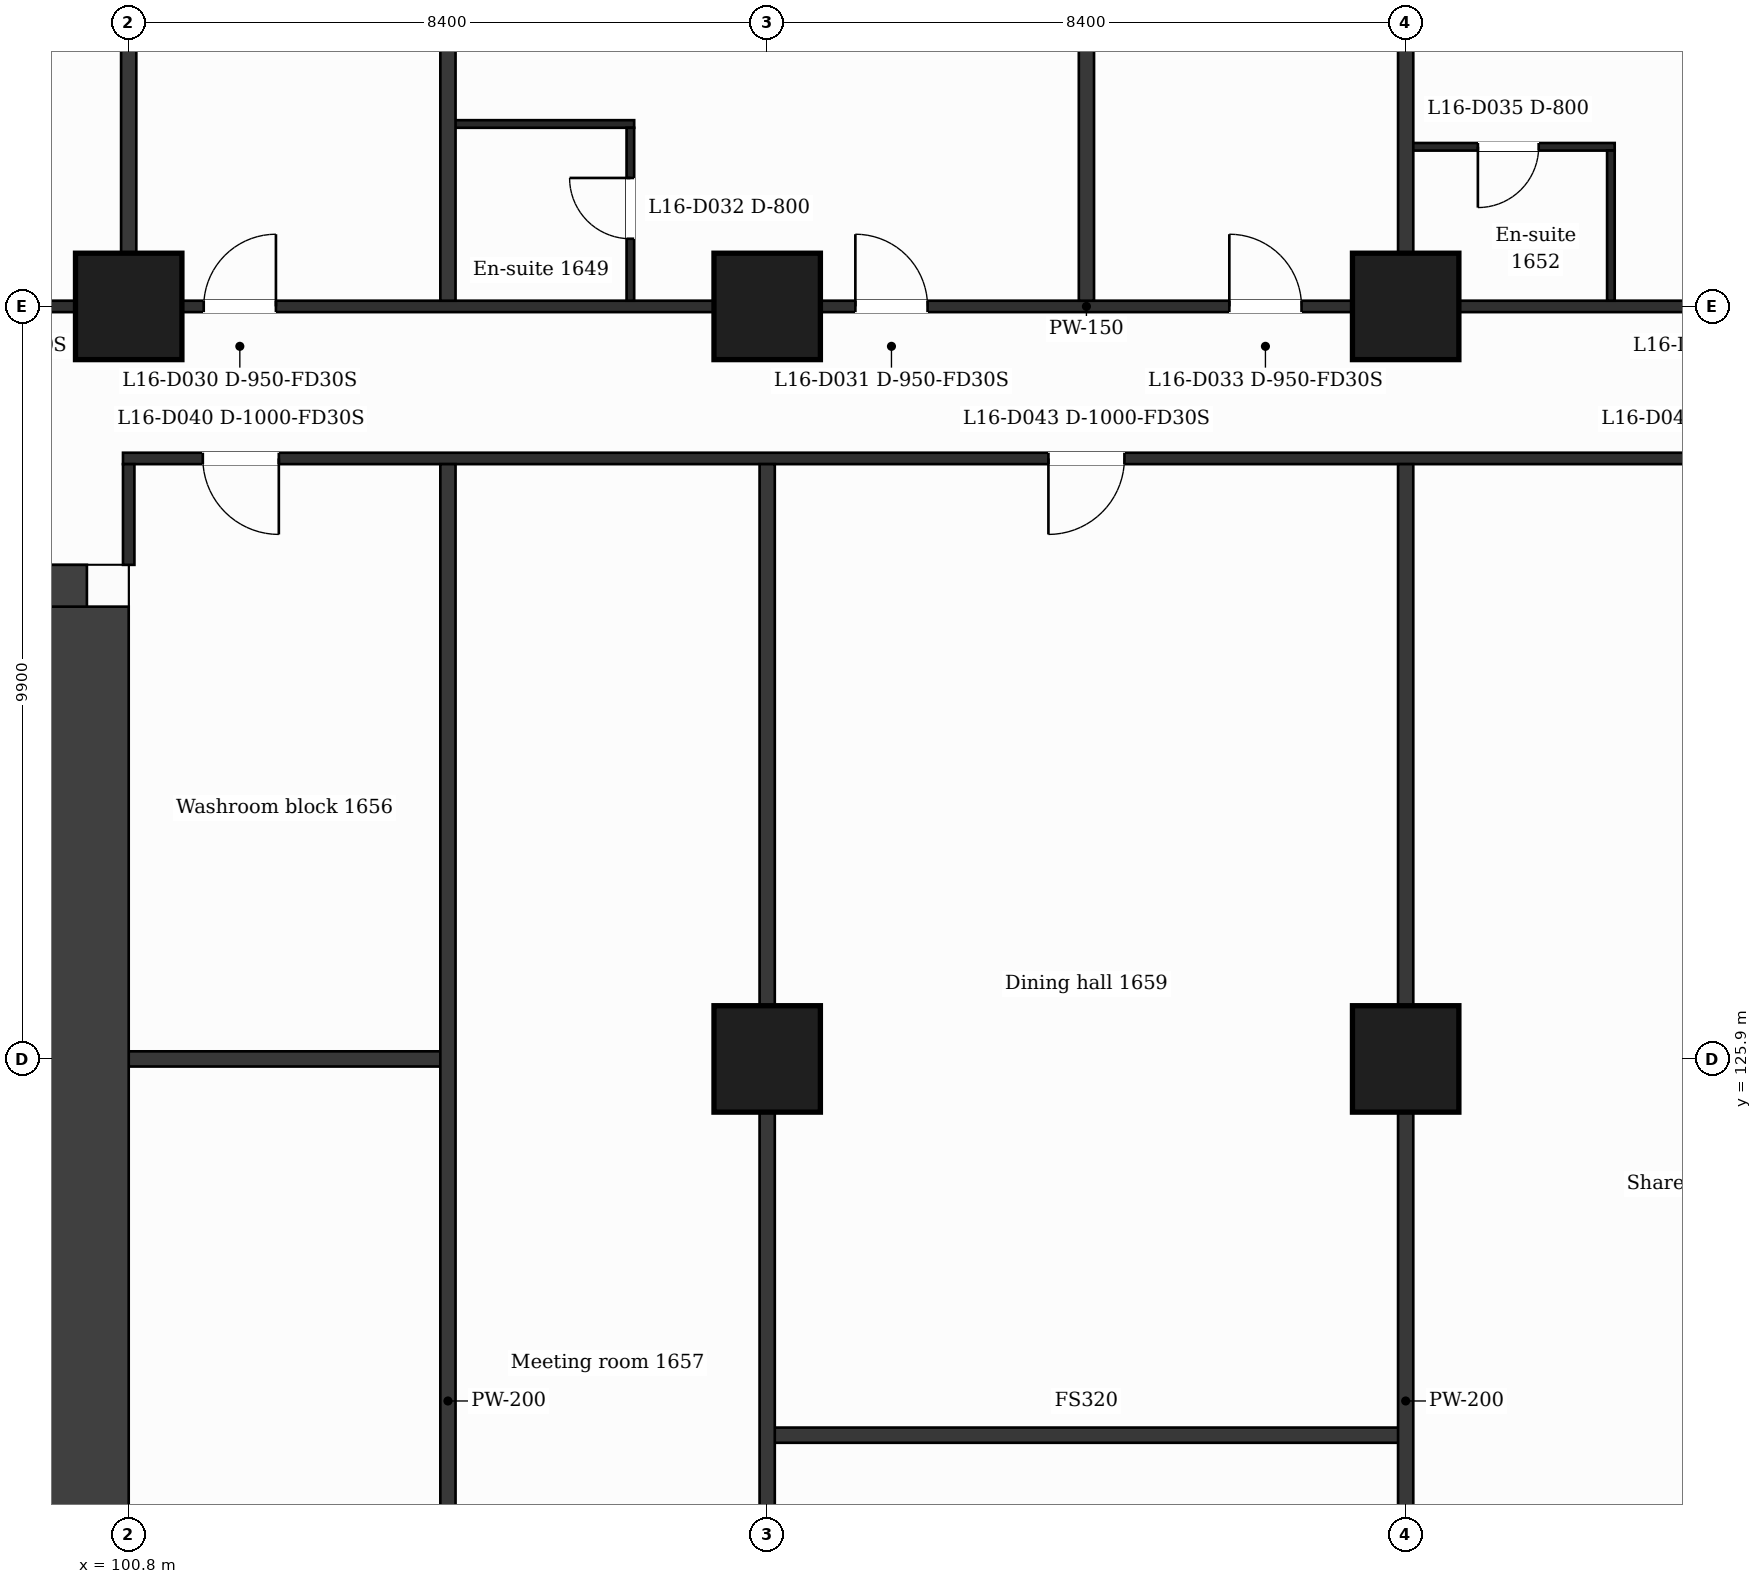
"""IFC4 building model, lengths in metres.
Left out: names, types, materials, properties, quantities, classifications, styles, units other than length and angle.
Written with IfcOpenShell. Run it as: python <this file> out.ifc"""

import sys

from ifc_helpers import new_model, si_unit, direction, frame, frame_2d, origin, origin_2d, place, context, subcontext, project, spatial, rectangle, extrude, element, fill, save


model = new_model("IFC4")
c1 = context("Model", 3, precision=1e-05, world=origin(), true_north=direction((0.0, 1.0)))
c2 = subcontext(c1, "Body", "Model", "MODEL_VIEW")
j1 = project(units=[si_unit("LENGTHUNIT", "METRE"), si_unit("PLANEANGLEUNIT", "RADIAN")], contexts=[c1])
p1 = place(None, origin())
s1 = spatial("IfcSite", under=j1, at=p1, CompositionType="ELEMENT")
p2 = place(p1, origin())
s2 = spatial("IfcBuilding", under=s1, at=p2, CompositionType="ELEMENT")
p3 = place(p2, frame((0.0, 0.0, 74.0)))
s3 = spatial("IfcBuildingStorey", under=s2, at=p3, CompositionType="ELEMENT", Elevation=74.0)
p4 = place(p3, frame((89.112, 131.85, 0.0), z_axis=(0.0, 0.0, 1.0), x_axis=(1.0, 0.0, 0.0)))
e1 = element("IfcWall", 1, at=p4, inside=s3, PredefinedType="SHEAR", context=c2, shape_type="SweptSolid", body=[
    extrude(rectangle(XDim=11.138, YDim=1.1, at=frame_2d((5.569, 0.0))), origin(), (0.0, 0.0, 1.0), 3.5),
])
p5 = place(p4, frame((6.552, 0.0, 0.0)))
e2 = element("IfcOpeningElement", 2, at=p5, cuts=e1, PredefinedType="OPENING", context=c2, shape_type="SweptSolid", body=[
    extrude(rectangle(XDim=1.2, YDim=2.1, at=frame_2d((0.6, 1.05))), frame((0.0, 0.56, 0.0), z_axis=(0.0, -1.0, 0.0), x_axis=(1.0, 0.0, 0.0)), (0.0, 0.0, 1.0), 1.12),
])
p6 = place(p3, frame((100.25, 131.85, 0.0), z_axis=(0.0, 0.0, 1.0), x_axis=(0.0, -1.0, 0.0)))
e3 = element("IfcWall", 3, at=p6, inside=s3, PredefinedType="SHEAR", context=c2, shape_type="SweptSolid", body=[
    extrude(rectangle(XDim=20.9, YDim=1.1, at=frame_2d((10.45, 0.0))), origin(), (0.0, 0.0, 1.0), 3.5),
])
for number, where, z_axis, x_axis in (
    (4, (109.2, 125.9, 0.0), (0.0, 0.0, 1.0), (1.0, 0.0, 0.0)),
    (5, (117.6, 125.9, 0.0), (0.0, 0.0, 1.0), (1.0, 0.0, 0.0)),
    (6, (100.8, 135.8, 0.0), (0.0, 0.0, 1.0), (1.0, 0.0, 0.0)),
    (7, (109.2, 135.8, 0.0), (0.0, 0.0, 1.0), (1.0, 0.0, 0.0)),
    (8, (117.6, 135.8, 0.0), (0.0, 0.0, 1.0), (1.0, 0.0, 0.0)),
):
    element("IfcColumn", number, at=place(p3, frame(where, z_axis=z_axis, x_axis=x_axis)), inside=s3, PredefinedType="COLUMN", context=c2, shape_type="SweptSolid", body=[
        extrude(rectangle(XDim=1.4, YDim=1.4, at=origin_2d()), origin(), (0.0, 0.0, 1.0), 3.5),
    ])
p7 = place(p3, frame((109.2, 120.95, 0.0), z_axis=(0.0, 0.0, 1.0), x_axis=(1.0, 0.0, 0.0)))
e9 = element("IfcWall", 9, at=p7, inside=s3, PredefinedType="PARTITIONING", context=c2, shape_type="SweptSolid", body=[
    extrude(rectangle(XDim=8.4, YDim=0.2, at=frame_2d((4.2, 0.0))), origin(), (0.0, 0.0, 1.0), 3.18),
])
p8 = place(p3, frame((100.8, 125.9, 0.0), z_axis=(0.0, 0.0, 1.0), x_axis=(1.0, 0.0, 0.0)))
e10 = element("IfcWall", 10, at=p8, inside=s3, PredefinedType="PARTITIONING", context=c2, shape_type="SweptSolid", body=[
    extrude(rectangle(XDim=4.2, YDim=0.2, at=frame_2d((2.1, 0.0))), origin(), (0.0, 0.0, 1.0), 3.18),
])
p9 = place(p3, frame((100.725, 133.8, 0.0), z_axis=(0.0, 0.0, 1.0), x_axis=(1.0, 0.0, 0.0)))
e11 = element("IfcWall", 11, at=p9, inside=s3, PredefinedType="PARTITIONING", context=c2, shape_type="SweptSolid", body=[
    extrude(rectangle(XDim=25.35, YDim=0.15, at=frame_2d((12.675, 0.0))), origin(), (0.0, 0.0, 1.0), 3.18),
])
p10 = place(p9, frame((1.05, 0.0, 0.0)))
e12 = element("IfcOpeningElement", 12, at=p10, cuts=e11, PredefinedType="OPENING", context=c2, shape_type="SweptSolid", body=[
    extrude(rectangle(XDim=1.0, YDim=2.1, at=frame_2d((0.5, 1.05))), frame((0.0, 0.085, 0.0), z_axis=(0.0, -1.0, 0.0), x_axis=(1.0, 0.0, 0.0)), (0.0, 0.0, 1.0), 0.17),
])
p11 = place(p9, frame((12.175, 0.0, 0.0)))
e13 = element("IfcOpeningElement", 13, at=p11, cuts=e11, PredefinedType="OPENING", context=c2, shape_type="SweptSolid", body=[
    extrude(rectangle(XDim=1.0, YDim=2.1, at=frame_2d((0.5, 1.05))), frame((0.0, 0.085, 0.0), z_axis=(0.0, -1.0, 0.0), x_axis=(1.0, 0.0, 0.0)), (0.0, 0.0, 1.0), 0.17),
])
p12 = place(p9, frame((20.575, 0.0, 0.0)))
e14 = element("IfcOpeningElement", 14, at=p12, cuts=e11, PredefinedType="OPENING", context=c2, shape_type="SweptSolid", body=[
    extrude(rectangle(XDim=1.0, YDim=2.1, at=frame_2d((0.5, 1.05))), frame((0.0, 0.085, 0.0), z_axis=(0.0, -1.0, 0.0), x_axis=(1.0, 0.0, 0.0)), (0.0, 0.0, 1.0), 0.17),
])
p13 = place(p3, frame((90.895, 135.8, 0.0), z_axis=(0.0, 0.0, 1.0), x_axis=(1.0, 0.0, 0.0)))
e15 = element("IfcWall", 15, at=p13, inside=s3, PredefinedType="PARTITIONING", context=c2, shape_type="SweptSolid", body=[
    extrude(rectangle(XDim=45.011, YDim=0.15, at=frame_2d((22.505, 0.0))), origin(), (0.0, 0.0, 1.0), 3.18),
])
p14 = place(p13, frame((7.068, 0.0, 0.0)))
e16 = element("IfcOpeningElement", 16, at=p14, cuts=e15, PredefinedType="OPENING", context=c2, shape_type="SweptSolid", body=[
    extrude(rectangle(XDim=0.95, YDim=2.1, at=frame_2d((0.475, 1.05))), frame((0.0, 0.085, 0.0), z_axis=(0.0, -1.0, 0.0), x_axis=(1.0, 0.0, 0.0)), (0.0, 0.0, 1.0), 0.17),
])
p15 = place(p13, frame((10.892, 0.0, 0.0)))
e17 = element("IfcOpeningElement", 17, at=p15, cuts=e15, PredefinedType="OPENING", context=c2, shape_type="SweptSolid", body=[
    extrude(rectangle(XDim=0.95, YDim=2.1, at=frame_2d((0.475, 1.05))), frame((0.0, 0.085, 0.0), z_axis=(0.0, -1.0, 0.0), x_axis=(1.0, 0.0, 0.0)), (0.0, 0.0, 1.0), 0.17),
])
p16 = place(p13, frame((19.465, 0.0, 0.0)))
e18 = element("IfcOpeningElement", 18, at=p16, cuts=e15, PredefinedType="OPENING", context=c2, shape_type="SweptSolid", body=[
    extrude(rectangle(XDim=0.95, YDim=2.1, at=frame_2d((0.475, 1.05))), frame((0.0, 0.085, 0.0), z_axis=(0.0, -1.0, 0.0), x_axis=(1.0, 0.0, 0.0)), (0.0, 0.0, 1.0), 0.17),
])
p17 = place(p13, frame((24.385, 0.0, 0.0)))
e19 = element("IfcOpeningElement", 19, at=p17, cuts=e15, PredefinedType="OPENING", context=c2, shape_type="SweptSolid", body=[
    extrude(rectangle(XDim=0.95, YDim=2.1, at=frame_2d((0.475, 1.05))), frame((0.0, 0.085, 0.0), z_axis=(0.0, -1.0, 0.0), x_axis=(1.0, 0.0, 0.0)), (0.0, 0.0, 1.0), 0.17),
])
p18 = place(p13, frame((30.767, 0.0, 0.0)))
e20 = element("IfcOpeningElement", 20, at=p18, cuts=e15, PredefinedType="OPENING", context=c2, shape_type="SweptSolid", body=[
    extrude(rectangle(XDim=0.95, YDim=2.1, at=frame_2d((0.475, 1.05))), frame((0.0, 0.085, 0.0), z_axis=(0.0, -1.0, 0.0), x_axis=(1.0, 0.0, 0.0)), (0.0, 0.0, 1.0), 0.17),
])
p19 = place(p13, frame((40.314, 0.0, 0.0)))
e21 = element("IfcOpeningElement", 21, at=p19, cuts=e15, PredefinedType="OPENING", context=c2, shape_type="SweptSolid", body=[
    extrude(rectangle(XDim=0.95, YDim=2.1, at=frame_2d((0.475, 1.05))), frame((0.0, 0.085, 0.0), z_axis=(0.0, -1.0, 0.0), x_axis=(1.0, 0.0, 0.0)), (0.0, 0.0, 1.0), 0.17),
])
p20 = place(p3, frame((117.6, 137.9, 0.0), z_axis=(0.0, 0.0, 1.0), x_axis=(1.0, 0.0, 0.0)))
e22 = element("IfcWall", 22, at=p20, inside=s3, PredefinedType="PARTITIONING", context=c2, shape_type="SweptSolid", body=[
    extrude(rectangle(XDim=2.75, YDim=0.1, at=frame_2d((1.375, 0.0))), origin(), (0.0, 0.0, 1.0), 3.18),
])
p21 = place(p20, frame((0.95, 0.0, 0.0)))
e23 = element("IfcOpeningElement", 23, at=p21, cuts=e22, PredefinedType="OPENING", context=c2, shape_type="SweptSolid", body=[
    extrude(rectangle(XDim=0.8, YDim=2.1, at=frame_2d((0.4, 1.05))), frame((0.0, 0.06, 0.0), z_axis=(0.0, -1.0, 0.0), x_axis=(1.0, 0.0, 0.0)), (0.0, 0.0, 1.0), 0.12),
])
p22 = place(p3, frame((105.0, 138.2, 0.0), z_axis=(0.0, 0.0, 1.0), x_axis=(1.0, 0.0, 0.0)))
e24 = element("IfcWall", 24, at=p22, inside=s3, PredefinedType="PARTITIONING", context=c2, shape_type="SweptSolid", body=[
    extrude(rectangle(XDim=2.45, YDim=0.1, at=frame_2d((1.225, 0.0))), origin(), (0.0, 0.0, 1.0), 3.18),
])
p23 = place(p3, frame((100.8, 135.875, 0.0), z_axis=(0.0, 0.0, 1.0), x_axis=(0.0, 1.0, 0.0)))
e25 = element("IfcWall", 25, at=p23, inside=s3, PredefinedType="PARTITIONING", context=c2, shape_type="SweptSolid", body=[
    extrude(rectangle(XDim=7.135, YDim=0.2, at=frame_2d((3.567, 0.0))), origin(), (0.0, 0.0, 1.0), 3.18),
])
p24 = place(p3, frame((100.8, 132.4, 0.0), z_axis=(0.0, 0.0, 1.0), x_axis=(0.0, 1.0, 0.0)))
e26 = element("IfcWall", 26, at=p24, inside=s3, PredefinedType="PARTITIONING", context=c2, shape_type="SweptSolid", body=[
    extrude(rectangle(XDim=1.325, YDim=0.15, at=frame_2d((0.663, 0.0))), origin(), (0.0, 0.0, 1.0), 3.18),
])
p25 = place(p3, frame((105.0, 109.075, 0.0), z_axis=(0.0, 0.0, 1.0), x_axis=(0.0, 1.0, 0.0)))
e27 = element("IfcWall", 27, at=p25, inside=s3, PredefinedType="PARTITIONING", context=c2, shape_type="SweptSolid", body=[
    extrude(rectangle(XDim=24.65, YDim=0.2, at=frame_2d((12.325, 0.0))), origin(), (0.0, 0.0, 1.0), 3.18),
])
p26 = place(p3, frame((105.0, 135.875, 0.0), z_axis=(0.0, 0.0, 1.0), x_axis=(0.0, 1.0, 0.0)))
e28 = element("IfcWall", 28, at=p26, inside=s3, PredefinedType="PARTITIONING", context=c2, shape_type="SweptSolid", body=[
    extrude(rectangle(XDim=7.135, YDim=0.2, at=frame_2d((3.567, 0.0))), origin(), (0.0, 0.0, 1.0), 3.18),
])
p27 = place(p3, frame((107.4, 135.875, 0.0), z_axis=(0.0, 0.0, 1.0), x_axis=(0.0, 1.0, 0.0)))
e29 = element("IfcWall", 29, at=p27, inside=s3, PredefinedType="PARTITIONING", context=c2, shape_type="SweptSolid", body=[
    extrude(rectangle(XDim=2.275, YDim=0.1, at=frame_2d((1.137, 0.0))), origin(), (0.0, 0.0, 1.0), 3.18),
])
p28 = place(p27, frame((0.815, 0.0, 0.0)))
e30 = element("IfcOpeningElement", 30, at=p28, cuts=e29, PredefinedType="OPENING", context=c2, shape_type="SweptSolid", body=[
    extrude(rectangle(XDim=0.8, YDim=2.1, at=frame_2d((0.4, 1.05))), frame((0.0, 0.06, 0.0), z_axis=(0.0, -1.0, 0.0), x_axis=(1.0, 0.0, 0.0)), (0.0, 0.0, 1.0), 0.12),
])
p29 = place(p3, frame((109.2, 109.075, 0.0), z_axis=(0.0, 0.0, 1.0), x_axis=(0.0, 1.0, 0.0)))
e31 = element("IfcWall", 31, at=p29, inside=s3, PredefinedType="PARTITIONING", context=c2, shape_type="SweptSolid", body=[
    extrude(rectangle(XDim=24.65, YDim=0.2, at=frame_2d((12.325, 0.0))), origin(), (0.0, 0.0, 1.0), 3.18),
])
p30 = place(p3, frame((113.4, 135.875, 0.0), z_axis=(0.0, 0.0, 1.0), x_axis=(0.0, 1.0, 0.0)))
e32 = element("IfcWall", 32, at=p30, inside=s3, PredefinedType="PARTITIONING", context=c2, shape_type="SweptSolid", body=[
    extrude(rectangle(XDim=8.085, YDim=0.2, at=frame_2d((4.042, 0.0))), origin(), (0.0, 0.0, 1.0), 3.18),
])
p31 = place(p3, frame((117.6, 109.075, 0.0), z_axis=(0.0, 0.0, 1.0), x_axis=(0.0, 1.0, 0.0)))
e33 = element("IfcWall", 33, at=p31, inside=s3, PredefinedType="PARTITIONING", context=c2, shape_type="SweptSolid", body=[
    extrude(rectangle(XDim=24.65, YDim=0.2, at=frame_2d((12.325, 0.0))), origin(), (0.0, 0.0, 1.0), 3.18),
])
p32 = place(p3, frame((117.6, 135.875, 0.0), z_axis=(0.0, 0.0, 1.0), x_axis=(0.0, 1.0, 0.0)))
e34 = element("IfcWall", 34, at=p32, inside=s3, PredefinedType="PARTITIONING", context=c2, shape_type="SweptSolid", body=[
    extrude(rectangle(XDim=7.135, YDim=0.2, at=frame_2d((3.567, 0.0))), origin(), (0.0, 0.0, 1.0), 3.18),
])
p33 = place(p3, frame((120.3, 135.875, 0.0), z_axis=(0.0, 0.0, 1.0), x_axis=(0.0, 1.0, 0.0)))
e35 = element("IfcWall", 35, at=p33, inside=s3, PredefinedType="PARTITIONING", context=c2, shape_type="SweptSolid", body=[
    extrude(rectangle(XDim=1.975, YDim=0.1, at=frame_2d((0.988, 0.0))), origin(), (0.0, 0.0, 1.0), 3.18),
])
p34 = place(p15, origin())
e36 = element("IfcDoor", 36, at=p34, inside=s3, OperationType="SINGLE_SWING_RIGHT", PredefinedType="DOOR", context=c2, shape_type="SweptSolid", body=[
    extrude(rectangle(XDim=0.95, YDim=2.1, at=frame_2d((0.475, 1.05))), frame((0.0, 0.025, 0.0), z_axis=(0.0, -1.0, 0.0), x_axis=(1.0, 0.0, 0.0)), (0.0, 0.0, 1.0), 0.05),
])
fill(e17, e36)
p35 = place(p16, origin())
e37 = element("IfcDoor", 37, at=p35, inside=s3, OperationType="SINGLE_SWING_LEFT", PredefinedType="DOOR", context=c2, shape_type="SweptSolid", body=[
    extrude(rectangle(XDim=0.95, YDim=2.1, at=frame_2d((0.475, 1.05))), frame((0.0, 0.025, 0.0), z_axis=(0.0, -1.0, 0.0), x_axis=(1.0, 0.0, 0.0)), (0.0, 0.0, 1.0), 0.05),
])
fill(e18, e37)
p36 = place(p28, origin())
e38 = element("IfcDoor", 38, at=p36, inside=s3, OperationType="SINGLE_SWING_RIGHT", PredefinedType="DOOR", context=c2, shape_type="SweptSolid", body=[
    extrude(rectangle(XDim=0.8, YDim=2.1, at=frame_2d((0.4, 1.05))), frame((0.0, 0.025, 0.0), z_axis=(0.0, -1.0, 0.0), x_axis=(1.0, 0.0, 0.0)), (0.0, 0.0, 1.0), 0.05),
])
fill(e30, e38)
p37 = place(p17, origin())
e39 = element("IfcDoor", 39, at=p37, inside=s3, OperationType="SINGLE_SWING_LEFT", PredefinedType="DOOR", context=c2, shape_type="SweptSolid", body=[
    extrude(rectangle(XDim=0.95, YDim=2.1, at=frame_2d((0.475, 1.05))), frame((0.0, 0.025, 0.0), z_axis=(0.0, -1.0, 0.0), x_axis=(1.0, 0.0, 0.0)), (0.0, 0.0, 1.0), 0.05),
])
fill(e19, e39)
p38 = place(p21, origin())
e40 = element("IfcDoor", 40, at=p38, inside=s3, OperationType="SINGLE_SWING_LEFT", PredefinedType="DOOR", context=c2, shape_type="SweptSolid", body=[
    extrude(rectangle(XDim=0.8, YDim=2.1, at=frame_2d((0.4, 1.05))), frame((0.0, 0.025, 0.0), z_axis=(0.0, -1.0, 0.0), x_axis=(1.0, 0.0, 0.0)), (0.0, 0.0, 1.0), 0.05),
])
fill(e23, e40)
p39 = place(p10, origin())
e41 = element("IfcDoor", 41, at=p39, inside=s3, OperationType="SINGLE_SWING_RIGHT", PredefinedType="DOOR", context=c2, shape_type="SweptSolid", body=[
    extrude(rectangle(XDim=1.0, YDim=2.1, at=frame_2d((0.5, 1.05))), frame((0.0, 0.025, 0.0), z_axis=(0.0, -1.0, 0.0), x_axis=(1.0, 0.0, 0.0)), (0.0, 0.0, 1.0), 0.05),
])
fill(e12, e41)
p40 = place(p11, origin())
e42 = element("IfcDoor", 42, at=p40, inside=s3, OperationType="SINGLE_SWING_LEFT", PredefinedType="DOOR", context=c2, shape_type="SweptSolid", body=[
    extrude(rectangle(XDim=1.0, YDim=2.1, at=frame_2d((0.5, 1.05))), frame((0.0, 0.025, 0.0), z_axis=(0.0, -1.0, 0.0), x_axis=(1.0, 0.0, 0.0)), (0.0, 0.0, 1.0), 0.05),
])
fill(e13, e42)
save(model, sys.argv[1])
